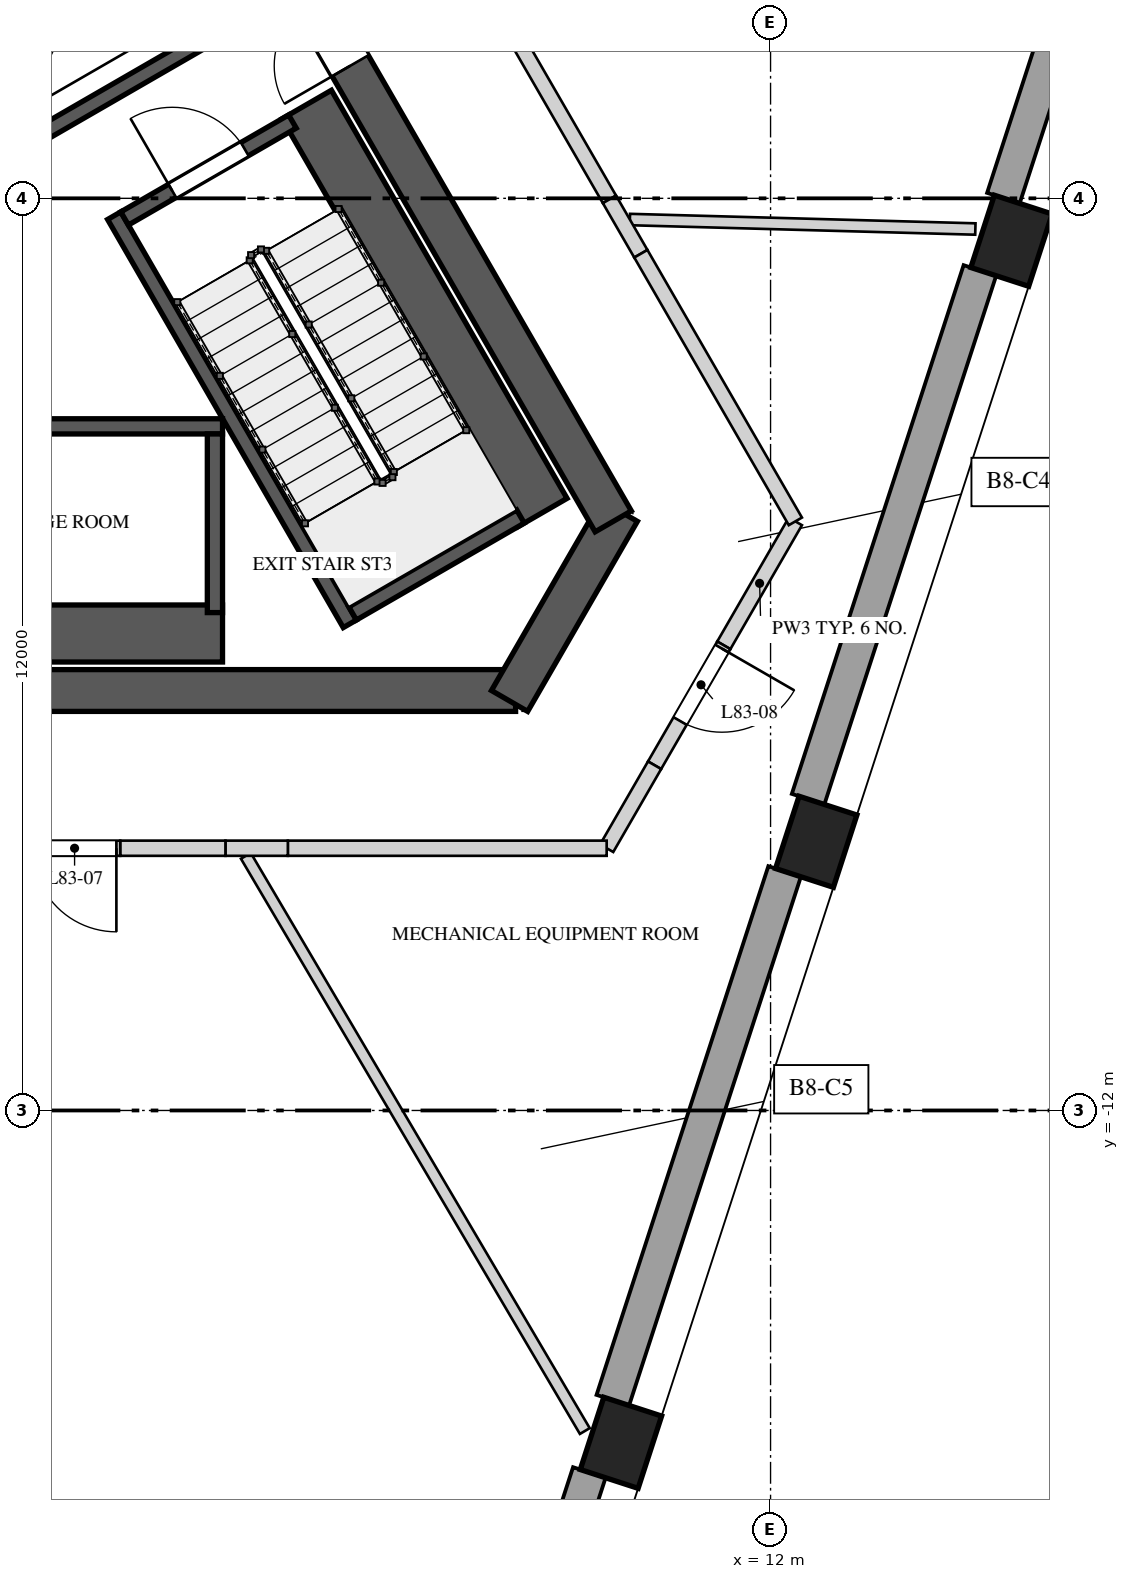
"""IFC4 building model, lengths in metres.
Left out: names, types, materials, properties, quantities, classifications, styles, units other than length and angle.
Written with IfcOpenShell. Run it as: python <this file> out.ifc"""

import sys

from ifc_helpers import new_model, si_unit, direction, frame, frame_2d, origin, origin_2d, place, context, subcontext, project, spatial, polyline, rectangle, outline, extrude, element, fill, save


model = new_model("IFC4")
c1 = context("Model", 3, precision=1e-05, world=origin(), true_north=direction((0.0, 1.0)))
c2 = subcontext(c1, "Body", "Model", "MODEL_VIEW")
j1 = project(units=[si_unit("LENGTHUNIT", "METRE"), si_unit("PLANEANGLEUNIT", "RADIAN")], contexts=[c1])
p1 = place(None, origin())
s1 = spatial("IfcSite", under=j1, at=p1, CompositionType="ELEMENT")
p2 = place(p1, origin())
s2 = spatial("IfcBuilding", under=s1, at=p2, CompositionType="ELEMENT")
p3 = place(p2, frame((0.0, 0.0, 361.4)))
s3 = spatial("IfcBuildingStorey", under=s2, at=p3, CompositionType="ELEMENT", Elevation=361.4)
p4 = place(p3, frame((-8.646, -6.475, 0.0), z_axis=(0.0, 0.0, 1.0), x_axis=(1.0, 0.0, 0.0)))
e1 = element("IfcWall", 1, at=p4, inside=s3, PredefinedType="SHEAR", context=c2, shape_type="SweptSolid", body=[
    extrude(rectangle(XDim=17.292, YDim=0.55, at=frame_2d((8.646, 0.0))), origin(), (0.0, 0.0, 1.0), 4.5),
])
p5 = place(p4, frame((6.851, 0.0, 0.0)))
e2 = element("IfcOpeningElement", 2, at=p5, cuts=e1, PredefinedType="OPENING", context=c2, shape_type="SweptSolid", body=[
    extrude(rectangle(XDim=1.0, YDim=2.4, at=frame_2d((0.5, 1.2))), frame((0.0, 0.285, 0.0), z_axis=(0.0, -1.0, 0.0), x_axis=(1.0, 0.0, 0.0)), (0.0, 0.0, 1.0), 0.57),
])
p6 = place(p3, frame((8.566, -6.613, 0.0), z_axis=(0.0, 0.0, 1.0), x_axis=(0.499995765644, 0.866027848477, 0.0)))
e3 = element("IfcWall", 3, at=p6, inside=s3, PredefinedType="SHEAR", context=c2, shape_type="SweptSolid", body=[
    extrude(rectangle(XDim=2.887, YDim=0.55, at=frame_2d((1.443, 0.0))), origin(), (0.0, 0.0, 1.0), 4.5),
])
p7 = place(p3, frame((9.93, -4.25, 0.0), z_axis=(0.0, 0.0, 1.0), x_axis=(-0.499994590896, 0.86602852671, 0.0)))
e4 = element("IfcWall", 4, at=p7, inside=s3, PredefinedType="SHEAR", context=c2, shape_type="SweptSolid", body=[
    extrude(rectangle(XDim=17.292, YDim=0.55, at=frame_2d((8.646, 0.0))), origin(), (0.0, 0.0, 1.0), 4.5),
])
p8 = place(p7, frame((6.921, 0.0, 0.0)))
e5 = element("IfcOpeningElement", 5, at=p8, cuts=e4, PredefinedType="OPENING", context=c2, shape_type="SweptSolid", body=[
    extrude(rectangle(XDim=1.0, YDim=2.4, at=frame_2d((0.5, 1.2))), frame((0.0, 0.285, 0.0), z_axis=(0.0, -1.0, 0.0), x_axis=(1.0, 0.0, 0.0)), (0.0, 0.0, 1.0), 0.57),
])
for number, where, z_axis, x_axis in (
    (6, (10.032, -16.372, 0.0), (0.0, 0.0, 1.0), (0.309, 0.951, 0.0)),
    (7, (12.601, -8.465, 0.0), (0.0, 0.0, 1.0), (0.309, 0.951, 0.0)),
    (8, (15.17, -0.558, 0.0), (0.0, 0.0, 1.0), (0.309, 0.951, 0.0)),
):
    element("IfcColumn", number, at=place(p3, frame(where, z_axis=z_axis, x_axis=x_axis)), inside=s3, PredefinedType="COLUMN", context=c2, shape_type="SweptSolid", body=[
        extrude(rectangle(XDim=1.0, YDim=0.8, at=origin_2d()), origin(), (0.0, 0.0, 1.0), 4.5),
    ])
p9 = place(p3, frame((7.541, -23.148, 0.0), z_axis=(0.0, 0.0, 1.0), x_axis=(0.309018647645, 0.951055979114, 0.0)))
e9 = element("IfcWall", 9, at=p9, inside=s3, PredefinedType="SOLIDWALL", context=c2, shape_type="SweptSolid", body=[
    extrude(rectangle(XDim=6.714, YDim=0.45, at=frame_2d((3.357, 0.0))), origin(), (0.0, 0.0, 1.0), 3.8),
])
for number, where, z_axis, x_axis in (
    (10, (9.925, -15.812, 0.0), (0.0, 0.0, 1.0), (0.309, 0.951, 0.0)),
    (11, (12.494, -7.905, 0.0), (0.0, 0.0, 1.0), (0.309, 0.951, 0.0)),
    (12, (15.063, 0.002, 0.0), (0.0, 0.0, 1.0), (0.309, 0.951, 0.0)),
):
    element("IfcWall", number, at=place(p3, frame(where, z_axis=z_axis, x_axis=x_axis)), inside=s3, PredefinedType="SOLIDWALL", context=c2, shape_type="SweptSolid", body=[
        extrude(rectangle(XDim=7.314, YDim=0.45, at=frame_2d((3.657, 0.0))), origin(), (0.0, 0.0, 1.0), 3.8),
    ])
p10 = place(p3, frame((8.998, -4.135, 0.0), z_axis=(0.0, 0.0, 1.0), x_axis=(-0.500009909098, 0.866019682689, 0.0)))
e13 = element("IfcWall", 13, at=p10, inside=s3, PredefinedType="SOLIDWALL", context=c2, shape_type="SweptSolid", body=[
    extrude(rectangle(XDim=6.2, YDim=0.75, at=frame_2d((3.1, 0.0))), origin(), (0.0, 0.0, 1.0), 4.15),
])
p11 = place(p3, frame((6.465, -5.597, 0.0), z_axis=(0.0, 0.0, 1.0), x_axis=(-0.49998037582, 0.866036733513, 0.0)))
e14 = element("IfcWall", 14, at=p11, inside=s3, PredefinedType="SOLIDWALL", context=c2, shape_type="SweptSolid", body=[
    extrude(rectangle(XDim=6.2, YDim=0.2, at=frame_2d((3.1, 0.0))), origin(), (0.0, 0.0, 1.0), 4.15),
])
p12 = place(p3, frame((6.501, -5.461, 0.0), z_axis=(0.0, 0.0, 1.0), x_axis=(0.865989465428, 0.500062241894, 0.0)))
e15 = element("IfcWall", 15, at=p12, inside=s3, PredefinedType="SOLIDWALL", context=c2, shape_type="SweptSolid", body=[
    extrude(rectangle(XDim=2.55, YDim=0.2, at=frame_2d((1.275, 0.0))), origin(), (0.0, 0.0, 1.0), 4.15),
])
p13 = place(p3, frame((3.501, -0.265, 0.0), z_axis=(0.0, 0.0, 1.0), x_axis=(0.866030925526, 0.499990435942, 0.0)))
e16 = element("IfcWall", 16, at=p13, inside=s3, PredefinedType="SOLIDWALL", context=c2, shape_type="SweptSolid", body=[
    extrude(rectangle(XDim=2.55, YDim=0.2, at=frame_2d((1.275, 0.0))), origin(), (0.0, 0.0, 1.0), 4.15),
])
p14 = place(p13, frame((0.725, 0.0, 0.0)))
e17 = element("IfcOpeningElement", 17, at=p14, cuts=e16, PredefinedType="OPENING", context=c2, shape_type="SweptSolid", body=[
    extrude(rectangle(XDim=1.1, YDim=2.4, at=frame_2d((0.55, 1.2))), frame((0.0, 0.11, 0.0), z_axis=(0.0, -1.0, 0.0), x_axis=(1.0, 0.0, 0.0)), (0.0, 0.0, 1.0), 0.22),
])
p15 = place(p3, frame((4.79, -3.0, 0.0), z_axis=(0.0, 0.0, 1.0), x_axis=(-1.0, 0.0, 0.0)))
e18 = element("IfcWall", 18, at=p15, inside=s3, PredefinedType="SOLIDWALL", context=c2, shape_type="SweptSolid", body=[
    extrude(rectangle(XDim=5.5, YDim=0.2, at=frame_2d((2.75, 0.0))), origin(), (0.0, 0.0, 1.0), 4.15),
])
p16 = place(p15, frame((2.275, 0.0, 0.0)))
e19 = element("IfcOpeningElement", 19, at=p16, cuts=e18, PredefinedType="OPENING", context=c2, shape_type="SweptSolid", body=[
    extrude(rectangle(XDim=0.95, YDim=2.4, at=frame_2d((0.475, 1.2))), frame((0.0, 0.11, 0.0), z_axis=(0.0, -1.0, 0.0), x_axis=(1.0, 0.0, 0.0)), (0.0, 0.0, 1.0), 0.22),
])
p17 = place(p3, frame((-0.71, -5.725, 0.0), z_axis=(0.0, 0.0, 1.0), x_axis=(1.0, 0.0, 0.0)))
e20 = element("IfcWall", 20, at=p17, inside=s3, PredefinedType="SOLIDWALL", context=c2, shape_type="SweptSolid", body=[
    extrude(rectangle(XDim=5.5, YDim=0.75, at=frame_2d((2.75, 0.0))), origin(), (0.0, 0.0, 1.0), 4.15),
])
p18 = place(p3, frame((4.69, -3.1, 0.0), z_axis=(0.0, 0.0, 1.0), x_axis=(0.0, -1.0, 0.0)))
e21 = element("IfcWall", 21, at=p18, inside=s3, PredefinedType="SOLIDWALL", context=c2, shape_type="SweptSolid", body=[
    extrude(rectangle(XDim=2.35, YDim=0.2, at=frame_2d((1.175, 0.0))), origin(), (0.0, 0.0, 1.0), 4.15),
])
p19 = place(p3, frame((2.227, 0.743, 0.0), z_axis=(0.0, 0.0, 1.0), x_axis=(0.866035871367, 0.499981869177, 0.0)))
e22 = element("IfcWall", 22, at=p19, inside=s3, PredefinedType="SOLIDWALL", context=c2, shape_type="SweptSolid", body=[
    extrude(rectangle(XDim=3.15, YDim=0.2, at=frame_2d((1.575, 0.0))), origin(), (0.0, 0.0, 1.0), 4.15),
])
p20 = place(p3, frame((5.097, -8.65, 0.0), z_axis=(0.0, 0.0, 1.0), x_axis=(0.507661360347, -0.861556697618, 0.0)))
e23 = element("IfcWall", 23, at=p20, inside=s3, PredefinedType="PARTITIONING", context=c2, shape_type="SweptSolid", body=[
    extrude(rectangle(XDim=8.783, YDim=0.15, at=frame_2d((4.392, 0.0))), origin(), (0.0, 0.0, 1.0), 3.45),
])
p21 = place(p3, frame((14.694, -0.404, 0.0), z_axis=(0.0, 0.0, 1.0), x_axis=(-0.999623515505, 0.027437697611, 0.0)))
e24 = element("IfcWall", 24, at=p21, inside=s3, PredefinedType="PARTITIONING", context=c2, shape_type="SweptSolid", body=[
    extrude(rectangle(XDim=4.547, YDim=0.15, at=frame_2d((2.273, 0.0))), origin(), (0.0, 0.0, 1.0), 3.45),
])
p22 = place(p3, frame((12.326, -4.25, 0.0), z_axis=(0.0, 0.0, 1.0), x_axis=(-0.500044242988, -0.865999858577, 0.0)))
e25 = element("IfcWall", 25, at=p22, inside=s3, PredefinedType="SOLIDWALL", context=c2, shape_type="SweptSolid", body=[
    extrude(rectangle(XDim=1.883, YDim=0.2, at=frame_2d((0.941, 0.0))), origin(), (0.0, 0.0, 1.0), 4.15),
])
p23 = place(p3, frame((11.385, -5.88, 0.0), z_axis=(0.0, 0.0, 1.0), x_axis=(-0.500016339278, -0.866015970092, 0.0)))
e26 = element("IfcWall", 26, at=p23, inside=s3, PredefinedType="SOLIDWALL", context=c2, shape_type="SweptSolid", body=[
    extrude(outline(polyline([(0.0, 0.0), (1.822, 0.0), (1.822, 3.45), (1.12, 3.45), (1.12, 4.15), (0.0, 4.15), (0.0, 0.0)])), frame((0.0, 0.1, 0.0), z_axis=(0.0, -1.0, 0.0), x_axis=(1.0, 0.0, 0.0)), (0.0, 0.0, 1.0), 0.2),
])
p24 = place(p23, frame((0.05, 0.0, 0.0)))
e27 = element("IfcOpeningElement", 27, at=p24, cuts=e26, PredefinedType="OPENING", context=c2, shape_type="SweptSolid", body=[
    extrude(rectangle(XDim=1.1, YDim=2.4, at=frame_2d((0.55, 1.2))), frame((0.0, 0.11, 0.0), z_axis=(0.0, -1.0, 0.0), x_axis=(1.0, 0.0, 0.0)), (0.0, 0.0, 1.0), 0.22),
])
p25 = place(p3, frame((10.474, -7.458, 0.0), z_axis=(0.0, 0.0, 1.0), x_axis=(-0.499929168788, -0.866066294342, 0.0)))
e28 = element("IfcWall", 28, at=p25, inside=s3, PredefinedType="SOLIDWALL", context=c2, shape_type="SweptSolid", body=[
    extrude(rectangle(XDim=1.261, YDim=0.2, at=frame_2d((0.63, 0.0))), origin(), (0.0, 0.0, 1.0), 4.15),
])
p26 = place(p3, frame((9.844, -8.55, 0.0), z_axis=(0.0, 0.0, 1.0), x_axis=(-1.0, 0.0, 0.0)))
e29 = element("IfcWall", 29, at=p26, inside=s3, PredefinedType="SOLIDWALL", context=c2, shape_type="SweptSolid", body=[
    extrude(rectangle(XDim=4.194, YDim=0.2, at=frame_2d((2.097, 0.0))), origin(), (0.0, 0.0, 1.0), 4.15),
])
p27 = place(p3, frame((5.649, -8.55, 0.0), z_axis=(0.0, 0.0, 1.0), x_axis=(-1.0, 0.0, 0.0)))
e30 = element("IfcWall", 30, at=p27, inside=s3, PredefinedType="SOLIDWALL", context=c2, shape_type="SweptSolid", body=[
    extrude(rectangle(XDim=0.821, YDim=0.2, at=frame_2d((0.411, 0.0))), origin(), (0.0, 0.0, 1.0), 3.45),
])
p28 = place(p3, frame((4.828, -8.55, 0.0), z_axis=(0.0, 0.0, 1.0), x_axis=(-1.0, 0.0, 0.0)))
e31 = element("IfcWall", 31, at=p28, inside=s3, PredefinedType="SOLIDWALL", context=c2, shape_type="SweptSolid", body=[
    extrude(rectangle(XDim=1.385, YDim=0.2, at=frame_2d((0.692, 0.0))), origin(), (0.0, 0.0, 1.0), 4.15),
])
p29 = place(p3, frame((3.444, -8.55, 0.0), z_axis=(0.0, 0.0, 1.0), x_axis=(-1.0, 0.0, 0.0)))
e32 = element("IfcWall", 32, at=p29, inside=s3, PredefinedType="SOLIDWALL", context=c2, shape_type="SweptSolid", body=[
    extrude(outline(polyline([(0.0, 0.0), (1.215, 0.0), (1.215, 3.05), (0.271, 3.05), (0.271, 4.15), (0.0, 4.15), (0.0, 0.0)])), frame((0.0, 0.1, 0.0), z_axis=(0.0, -1.0, 0.0), x_axis=(1.0, 0.0, 0.0)), (0.0, 0.0, 1.0), 0.2),
])
p30 = place(p29, frame((0.05, 0.0, 0.0)))
e33 = element("IfcOpeningElement", 33, at=p30, cuts=e32, PredefinedType="OPENING", context=c2, shape_type="SweptSolid", body=[
    extrude(rectangle(XDim=1.1, YDim=2.4, at=frame_2d((0.55, 1.2))), frame((0.0, 0.11, 0.0), z_axis=(0.0, -1.0, 0.0), x_axis=(1.0, 0.0, 0.0)), (0.0, 0.0, 1.0), 0.22),
])
p31 = place(p3, frame((8.242, 2.824, 0.0), z_axis=(0.0, 0.0, 1.0), x_axis=(0.500001965626, -0.866024268927, 0.0)))
e34 = element("IfcWall", 34, at=p31, inside=s3, PredefinedType="SOLIDWALL", context=c2, shape_type="SweptSolid", body=[
    extrude(rectangle(XDim=3.276, YDim=0.2, at=frame_2d((1.638, 0.0))), origin(), (0.0, 0.0, 1.0), 4.15),
])
p32 = place(p3, frame((9.88, -0.013, 0.0), z_axis=(0.0, 0.0, 1.0), x_axis=(0.499952654668, -0.866052736899, 0.0)))
e35 = element("IfcWall", 35, at=p32, inside=s3, PredefinedType="SOLIDWALL", context=c2, shape_type="SweptSolid", body=[
    extrude(rectangle(XDim=0.826, YDim=0.2, at=frame_2d((0.413, 0.0))), origin(), (0.0, 0.0, 1.0), 3.45),
])
p33 = place(p3, frame((10.293, -0.729, 0.0), z_axis=(0.0, 0.0, 1.0), x_axis=(0.50002046505, -0.86601358796, 0.0)))
e36 = element("IfcWall", 36, at=p33, inside=s3, PredefinedType="SOLIDWALL", context=c2, shape_type="SweptSolid", body=[
    extrude(rectangle(XDim=4.066, YDim=0.2, at=frame_2d((2.033, 0.0))), origin(), (0.0, 0.0, 1.0), 4.15),
])
p34 = place(p14, origin())
e37 = element("IfcDoor", 37, at=p34, inside=s3, OperationType="SINGLE_SWING_RIGHT", PredefinedType="DOOR", context=c2, shape_type="SweptSolid", body=[
    extrude(rectangle(XDim=1.1, YDim=2.4, at=frame_2d((0.55, 1.2))), frame((0.0, 0.025, 0.0), z_axis=(0.0, -1.0, 0.0), x_axis=(1.0, 0.0, 0.0)), (0.0, 0.0, 1.0), 0.05),
])
fill(e17, e37)
p35 = place(p8, origin())
e38 = element("IfcDoor", 38, at=p35, inside=s3, OperationType="SINGLE_SWING_RIGHT", PredefinedType="DOOR", context=c2, shape_type="SweptSolid", body=[
    extrude(rectangle(XDim=1.0, YDim=2.4, at=frame_2d((0.5, 1.2))), frame((0.0, 0.025, 0.0), z_axis=(0.0, -1.0, 0.0), x_axis=(1.0, 0.0, 0.0)), (0.0, 0.0, 1.0), 0.05),
])
fill(e5, e38)
p36 = place(p30, origin())
e39 = element("IfcDoor", 39, at=p36, inside=s3, OperationType="SINGLE_SWING_RIGHT", PredefinedType="DOOR", context=c2, shape_type="SweptSolid", body=[
    extrude(rectangle(XDim=1.1, YDim=2.4, at=frame_2d((0.55, 1.2))), frame((0.0, 0.025, 0.0), z_axis=(0.0, -1.0, 0.0), x_axis=(1.0, 0.0, 0.0)), (0.0, 0.0, 1.0), 0.05),
])
fill(e33, e39)
p37 = place(p24, origin())
e40 = element("IfcDoor", 40, at=p37, inside=s3, OperationType="SINGLE_SWING_LEFT", PredefinedType="DOOR", context=c2, shape_type="SweptSolid", body=[
    extrude(rectangle(XDim=1.1, YDim=2.4, at=frame_2d((0.55, 1.2))), frame((0.0, 0.025, 0.0), z_axis=(0.0, -1.0, 0.0), x_axis=(1.0, 0.0, 0.0)), (0.0, 0.0, 1.0), 0.05),
])
fill(e27, e40)
save(model, sys.argv[1])
